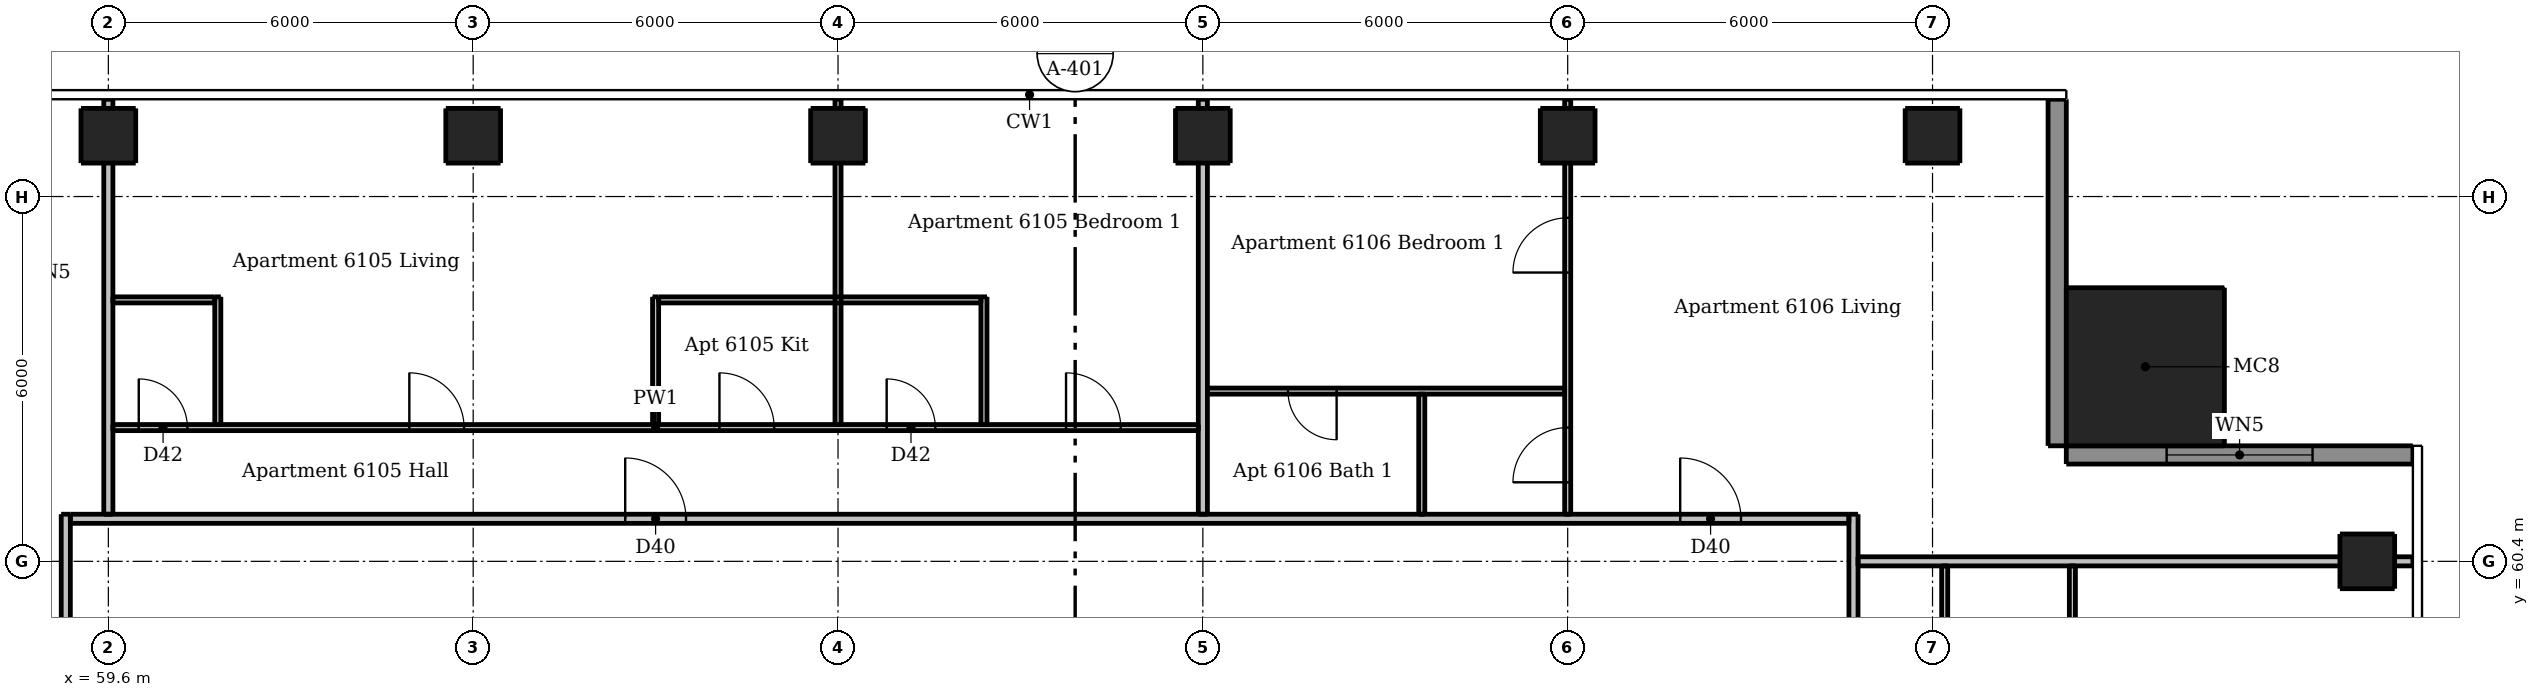
"""IFC4 building model, lengths in metres.
Left out: names, types, materials, properties, quantities, classifications, styles, units other than length and angle.
Written with IfcOpenShell. Run it as: python <this file> out.ifc"""

import sys

from ifc_helpers import new_model, si_unit, direction, frame, frame_2d, origin, origin_2d, place, context, subcontext, project, spatial, rectangle, extrude, element, fill, save


model = new_model("IFC4")
c1 = context("Model", 3, precision=1e-05, world=origin(), true_north=direction((0.0, 1.0)))
c2 = subcontext(c1, "Body", "Model", "MODEL_VIEW")
j1 = project(units=[si_unit("LENGTHUNIT", "METRE"), si_unit("PLANEANGLEUNIT", "RADIAN")], contexts=[c1])
p1 = place(None, origin())
s1 = spatial("IfcSite", under=j1, at=p1, CompositionType="ELEMENT")
p2 = place(p1, origin())
s2 = spatial("IfcBuilding", under=s1, at=p2, CompositionType="ELEMENT")
p3 = place(p2, frame((0.0, 0.0, 226.6)))
s3 = spatial("IfcBuildingStorey", under=s2, at=p3, CompositionType="ELEMENT", Elevation=226.6)
for number, where, z_axis, x_axis in (
    (1, (96.75, 60.4, 0.0), (0.0, 0.0, 1.0), (1.0, 0.0, 0.0)),
    (2, (59.6, 67.4, 0.0), (0.0, 0.0, 1.0), (1.0, 0.0, 0.0)),
    (3, (65.6, 67.4, 0.0), (0.0, 0.0, 1.0), (1.0, 0.0, 0.0)),
    (4, (71.6, 67.4, 0.0), (0.0, 0.0, 1.0), (1.0, 0.0, 0.0)),
    (5, (77.6, 67.4, 0.0), (0.0, 0.0, 1.0), (1.0, 0.0, 0.0)),
    (6, (83.6, 67.4, 0.0), (0.0, 0.0, 1.0), (1.0, 0.0, 0.0)),
    (7, (89.6, 67.4, 0.0), (0.0, 0.0, 1.0), (1.0, 0.0, 0.0)),
):
    element("IfcColumn", number, at=place(p3, frame(where, z_axis=z_axis, x_axis=x_axis)), inside=s3, PredefinedType="COLUMN", context=c2, shape_type="SweptSolid", body=[
        extrude(rectangle(XDim=0.9, YDim=0.9, at=origin_2d()), origin(), (0.0, 0.0, 1.0), 2.95),
    ])
p4 = place(p3, frame((93.1, 63.6, 0.0), z_axis=(0.0, 0.0, 1.0), x_axis=(1.0, 0.0, 0.0)))
e8 = element("IfcColumn", 8, at=p4, inside=s3, PredefinedType="COLUMN", context=c2, shape_type="SweptSolid", body=[
    extrude(rectangle(XDim=2.6, YDim=2.6, at=origin_2d()), origin(), (0.0, 0.0, 1.0), 3.3),
])
p5 = place(p3, frame((97.5, 62.15, 0.0), z_axis=(0.0, 0.0, 1.0), x_axis=(-1.0, 0.0, 0.0)))
e9 = element("IfcWall", 9, at=p5, inside=s3, PredefinedType="SOLIDWALL", context=c2, shape_type="SweptSolid", body=[
    extrude(rectangle(XDim=5.7, YDim=0.3, at=frame_2d((2.85, 0.0))), origin(), (0.0, 0.0, 1.0), 2.95),
])
p6 = place(p5, frame((1.65, 0.0, 0.15)))
e10 = element("IfcOpeningElement", 10, at=p6, cuts=e9, PredefinedType="OPENING", context=c2, shape_type="SweptSolid", body=[
    extrude(rectangle(XDim=2.4, YDim=2.1, at=frame_2d((1.2, 1.05))), frame((0.0, 0.16, 0.0), z_axis=(0.0, -1.0, 0.0), x_axis=(1.0, 0.0, 0.0)), (0.0, 0.0, 1.0), 0.32),
])
p7 = place(p3, frame((91.65, 62.3, 0.0), z_axis=(0.0, 0.0, 1.0), x_axis=(0.0, 1.0, 0.0)))
e11 = element("IfcWall", 11, at=p7, inside=s3, PredefinedType="SOLIDWALL", context=c2, shape_type="SweptSolid", body=[
    extrude(rectangle(XDim=5.7, YDim=0.3, at=frame_2d((2.85, 0.0))), origin(), (0.0, 0.0, 1.0), 2.95),
])
for number, where, z_axis, x_axis in (
    (12, (61.4, 62.65, 0.0), (0.0, 0.0, 1.0), (0.0, 1.0, 0.0)),
    (13, (68.6, 62.65, 0.0), (0.0, 0.0, 1.0), (0.0, 1.0, 0.0)),
):
    element("IfcWall", number, at=place(p3, frame(where, z_axis=z_axis, x_axis=x_axis)), inside=s3, PredefinedType="PARTITIONING", context=c2, shape_type="SweptSolid", body=[
        extrude(rectangle(XDim=2.1, YDim=0.1, at=frame_2d((1.05, 0.0))), origin(), (0.0, 0.0, 1.0), 2.95),
    ])
p8 = place(p3, frame((71.6, 62.65, 0.0), z_axis=(0.0, 0.0, 1.0), x_axis=(0.0, 1.0, 0.0)))
e14 = element("IfcWall", 14, at=p8, inside=s3, PredefinedType="PARTITIONING", context=c2, shape_type="SweptSolid", body=[
    extrude(rectangle(XDim=5.35, YDim=0.1, at=frame_2d((2.675, 0.0))), origin(), (0.0, 0.0, 1.0), 2.332),
])
p9 = place(p3, frame((74.0, 62.65, 0.0), z_axis=(0.0, 0.0, 1.0), x_axis=(0.0, 1.0, 0.0)))
e15 = element("IfcWall", 15, at=p9, inside=s3, PredefinedType="PARTITIONING", context=c2, shape_type="SweptSolid", body=[
    extrude(rectangle(XDim=2.1, YDim=0.1, at=frame_2d((1.05, 0.0))), origin(), (0.0, 0.0, 1.0), 2.95),
])
p10 = place(p3, frame((81.2, 61.175, 0.0), z_axis=(0.0, 0.0, 1.0), x_axis=(0.0, 1.0, 0.0)))
e16 = element("IfcWall", 16, at=p10, inside=s3, PredefinedType="PARTITIONING", context=c2, shape_type="SweptSolid", body=[
    extrude(rectangle(XDim=1.975, YDim=0.1, at=frame_2d((0.987, 0.0))), origin(), (0.0, 0.0, 1.0), 2.95),
])
p11 = place(p3, frame((83.6, 61.175, 0.0), z_axis=(0.0, 0.0, 1.0), x_axis=(0.0, 1.0, 0.0)))
e17 = element("IfcWall", 17, at=p11, inside=s3, PredefinedType="PARTITIONING", context=c2, shape_type="SweptSolid", body=[
    extrude(rectangle(XDim=6.825, YDim=0.1, at=frame_2d((3.413, 0.0))), origin(), (0.0, 0.0, 1.0), 2.332),
])
p12 = place(p11, frame((0.525, 0.0, 0.0)))
e18 = element("IfcOpeningElement", 18, at=p12, cuts=e17, PredefinedType="OPENING", context=c2, shape_type="SweptSolid", body=[
    extrude(rectangle(XDim=0.9, YDim=2.1, at=frame_2d((0.45, 1.05))), frame((0.0, 0.06, 0.0), z_axis=(0.0, -1.0, 0.0), x_axis=(1.0, 0.0, 0.0)), (0.0, 0.0, 1.0), 0.12),
])
p13 = place(p11, frame((3.975, 0.0, 0.0)))
e19 = element("IfcOpeningElement", 19, at=p13, cuts=e17, PredefinedType="OPENING", context=c2, shape_type="SweptSolid", body=[
    extrude(rectangle(XDim=0.9, YDim=2.1, at=frame_2d((0.45, 1.05))), frame((0.0, 0.06, 0.0), z_axis=(0.0, -1.0, 0.0), x_axis=(1.0, 0.0, 0.0)), (0.0, 0.0, 1.0), 0.12),
])
p14 = place(p3, frame((89.8, 60.325, 0.0), z_axis=(0.0, 0.0, 1.0), x_axis=(0.0, -1.0, 0.0)))
e20 = element("IfcWall", 20, at=p14, inside=s3, PredefinedType="PARTITIONING", context=c2, shape_type="SweptSolid", body=[
    extrude(rectangle(XDim=20.85, YDim=0.1, at=frame_2d((10.425, 0.0))), origin(), (0.0, 0.0, 1.0), 2.95),
])
p15 = place(p14, frame((6.075, 0.0, 0.0)))
e21 = element("IfcOpeningElement", 21, at=p15, cuts=e20, PredefinedType="OPENING", context=c2, shape_type="SweptSolid", body=[
    extrude(rectangle(XDim=0.9, YDim=2.1, at=frame_2d((0.45, 1.05))), frame((0.0, 0.06, 0.0), z_axis=(0.0, -1.0, 0.0), x_axis=(1.0, 0.0, 0.0)), (0.0, 0.0, 1.0), 0.12),
])
p16 = place(p14, frame((0.975, 0.0, 0.0)))
e22 = element("IfcOpeningElement", 22, at=p16, cuts=e20, PredefinedType="OPENING", context=c2, shape_type="SweptSolid", body=[
    extrude(rectangle(XDim=0.9, YDim=2.1, at=frame_2d((0.45, 1.05))), frame((0.0, 0.06, 0.0), z_axis=(0.0, -1.0, 0.0), x_axis=(1.0, 0.0, 0.0)), (0.0, 0.0, 1.0), 0.12),
])
p17 = place(p14, frame((10.625, 0.0, 0.0)))
e23 = element("IfcOpeningElement", 23, at=p17, cuts=e20, PredefinedType="OPENING", context=c2, shape_type="SweptSolid", body=[
    extrude(rectangle(XDim=0.8, YDim=2.1, at=frame_2d((0.4, 1.05))), frame((0.0, 0.06, 0.0), z_axis=(0.0, -1.0, 0.0), x_axis=(1.0, 0.0, 0.0)), (0.0, 0.0, 1.0), 0.12),
])
p18 = place(p14, frame((18.975, 0.0, 0.0)))
e24 = element("IfcOpeningElement", 24, at=p18, cuts=e20, PredefinedType="OPENING", context=c2, shape_type="SweptSolid", body=[
    extrude(rectangle(XDim=0.9, YDim=2.1, at=frame_2d((0.45, 1.05))), frame((0.0, 0.06, 0.0), z_axis=(0.0, -1.0, 0.0), x_axis=(1.0, 0.0, 0.0)), (0.0, 0.0, 1.0), 0.12),
])
p19 = place(p14, frame((15.675, 0.0, 0.0)))
e25 = element("IfcOpeningElement", 25, at=p19, cuts=e20, PredefinedType="OPENING", context=c2, shape_type="SweptSolid", body=[
    extrude(rectangle(XDim=0.9, YDim=2.1, at=frame_2d((0.45, 1.05))), frame((0.0, 0.06, 0.0), z_axis=(0.0, -1.0, 0.0), x_axis=(1.0, 0.0, 0.0)), (0.0, 0.0, 1.0), 0.12),
])
p20 = place(p14, frame((12.725, 0.0, 0.0)))
e26 = element("IfcOpeningElement", 26, at=p20, cuts=e20, PredefinedType="OPENING", context=c2, shape_type="SweptSolid", body=[
    extrude(rectangle(XDim=0.8, YDim=2.1, at=frame_2d((0.4, 1.05))), frame((0.0, 0.06, 0.0), z_axis=(0.0, -1.0, 0.0), x_axis=(1.0, 0.0, 0.0)), (0.0, 0.0, 1.0), 0.12),
])
p21 = place(p3, frame((91.9, 57.35, 0.0), z_axis=(0.0, 0.0, 1.0), x_axis=(0.0, 1.0, 0.0)))
e27 = element("IfcWall", 27, at=p21, inside=s3, PredefinedType="PARTITIONING", context=c2, shape_type="SweptSolid", body=[
    extrude(rectangle(XDim=2.975, YDim=0.1, at=frame_2d((1.487, 0.0))), origin(), (0.0, 0.0, 1.0), 2.95),
])
p22 = place(p3, frame((59.675, 64.7, 0.0), z_axis=(0.0, 0.0, 1.0), x_axis=(1.0, 0.0, 0.0)))
e28 = element("IfcWall", 28, at=p22, inside=s3, PredefinedType="PARTITIONING", context=c2, shape_type="SweptSolid", body=[
    extrude(rectangle(XDim=1.675, YDim=0.1, at=frame_2d((0.837, 0.0))), origin(), (0.0, 0.0, 1.0), 2.95),
])
p23 = place(p3, frame((68.65, 64.7, 0.0), z_axis=(0.0, 0.0, 1.0), x_axis=(1.0, 0.0, 0.0)))
e29 = element("IfcWall", 29, at=p23, inside=s3, PredefinedType="PARTITIONING", context=c2, shape_type="SweptSolid", body=[
    extrude(rectangle(XDim=5.3, YDim=0.1, at=frame_2d((2.65, 0.0))), origin(), (0.0, 0.0, 1.0), 2.95),
])
p24 = place(p3, frame((83.55, 63.2, 0.0), z_axis=(0.0, 0.0, 1.0), x_axis=(-1.0, 0.0, 0.0)))
e30 = element("IfcWall", 30, at=p24, inside=s3, PredefinedType="PARTITIONING", context=c2, shape_type="SweptSolid", body=[
    extrude(rectangle(XDim=5.875, YDim=0.1, at=frame_2d((2.938, 0.0))), origin(), (0.0, 0.0, 1.0), 2.95),
])
p25 = place(p24, frame((3.75, 0.0, 0.0)))
e31 = element("IfcOpeningElement", 31, at=p25, cuts=e30, PredefinedType="OPENING", context=c2, shape_type="SweptSolid", body=[
    extrude(rectangle(XDim=0.8, YDim=2.1, at=frame_2d((0.4, 1.05))), frame((0.0, 0.06, 0.0), z_axis=(0.0, -1.0, 0.0), x_axis=(1.0, 0.0, 0.0)), (0.0, 0.0, 1.0), 0.12),
])
p26 = place(p3, frame((59.675, 62.6, 0.0), z_axis=(0.0, 0.0, 1.0), x_axis=(1.0, 0.0, 0.0)))
e32 = element("IfcWall", 32, at=p26, inside=s3, PredefinedType="PARTITIONING", context=c2, shape_type="SweptSolid", body=[
    extrude(rectangle(XDim=17.85, YDim=0.1, at=frame_2d((8.925, 0.0))), origin(), (0.0, 0.0, 1.0), 2.95),
])
p27 = place(p26, frame((4.875, 0.0, 0.0)))
e33 = element("IfcOpeningElement", 33, at=p27, cuts=e32, PredefinedType="OPENING", context=c2, shape_type="SweptSolid", body=[
    extrude(rectangle(XDim=0.9, YDim=2.1, at=frame_2d((0.45, 1.05))), frame((0.0, 0.06, 0.0), z_axis=(0.0, -1.0, 0.0), x_axis=(1.0, 0.0, 0.0)), (0.0, 0.0, 1.0), 0.12),
])
p28 = place(p26, frame((9.975, 0.0, 0.0)))
e34 = element("IfcOpeningElement", 34, at=p28, cuts=e32, PredefinedType="OPENING", context=c2, shape_type="SweptSolid", body=[
    extrude(rectangle(XDim=0.9, YDim=2.1, at=frame_2d((0.45, 1.05))), frame((0.0, 0.06, 0.0), z_axis=(0.0, -1.0, 0.0), x_axis=(1.0, 0.0, 0.0)), (0.0, 0.0, 1.0), 0.12),
])
p29 = place(p26, frame((0.425, 0.0, 0.0)))
e35 = element("IfcOpeningElement", 35, at=p29, cuts=e32, PredefinedType="OPENING", context=c2, shape_type="SweptSolid", body=[
    extrude(rectangle(XDim=0.8, YDim=2.1, at=frame_2d((0.4, 1.05))), frame((0.0, 0.06, 0.0), z_axis=(0.0, -1.0, 0.0), x_axis=(1.0, 0.0, 0.0)), (0.0, 0.0, 1.0), 0.12),
])
p30 = place(p26, frame((15.675, 0.0, 0.0)))
e36 = element("IfcOpeningElement", 36, at=p30, cuts=e32, PredefinedType="OPENING", context=c2, shape_type="SweptSolid", body=[
    extrude(rectangle(XDim=0.9, YDim=2.1, at=frame_2d((0.45, 1.05))), frame((0.0, 0.06, 0.0), z_axis=(0.0, -1.0, 0.0), x_axis=(1.0, 0.0, 0.0)), (0.0, 0.0, 1.0), 0.12),
])
p31 = place(p26, frame((12.725, 0.0, 0.0)))
e37 = element("IfcOpeningElement", 37, at=p31, cuts=e32, PredefinedType="OPENING", context=c2, shape_type="SweptSolid", body=[
    extrude(rectangle(XDim=0.8, YDim=2.1, at=frame_2d((0.4, 1.05))), frame((0.0, 0.06, 0.0), z_axis=(0.0, -1.0, 0.0), x_axis=(1.0, 0.0, 0.0)), (0.0, 0.0, 1.0), 0.12),
])
p32 = place(p3, frame((58.9, 30.325, 0.0), z_axis=(0.0, 0.0, 1.0), x_axis=(0.0, 1.0, 0.0)))
e38 = element("IfcWall", 38, at=p32, inside=s3, PredefinedType="PARTITIONING", context=c2, shape_type="SweptSolid", body=[
    extrude(rectangle(XDim=30.85, YDim=0.15, at=frame_2d((15.425, 0.0))), origin(), (0.0, 0.0, 1.0), 2.95),
])
p33 = place(p32, frame((9.225, 0.0, 0.0)))
e39 = element("IfcOpeningElement", 39, at=p33, cuts=e38, PredefinedType="OPENING", context=c2, shape_type="SweptSolid", body=[
    extrude(rectangle(XDim=1.0, YDim=2.1, at=frame_2d((0.5, 1.05))), frame((0.0, 0.085, 0.0), z_axis=(0.0, -1.0, 0.0), x_axis=(1.0, 0.0, 0.0)), (0.0, 0.0, 1.0), 0.17),
])
p34 = place(p32, frame((26.925, 0.0, 0.0)))
e40 = element("IfcOpeningElement", 40, at=p34, cuts=e38, PredefinedType="OPENING", context=c2, shape_type="SweptSolid", body=[
    extrude(rectangle(XDim=1.0, YDim=2.1, at=frame_2d((0.5, 1.05))), frame((0.0, 0.085, 0.0), z_axis=(0.0, -1.0, 0.0), x_axis=(1.0, 0.0, 0.0)), (0.0, 0.0, 1.0), 0.17),
])
for number, where, z_axis, x_axis in (
    (41, (59.6, 61.175, 0.0), (0.0, 0.0, 1.0), (0.0, 1.0, 0.0)),
    (42, (77.6, 61.175, 0.0), (0.0, 0.0, 1.0), (0.0, 1.0, 0.0)),
):
    element("IfcWall", number, at=place(p3, frame(where, z_axis=z_axis, x_axis=x_axis)), inside=s3, PredefinedType="PARTITIONING", context=c2, shape_type="SweptSolid", body=[
        extrude(rectangle(XDim=6.825, YDim=0.15, at=frame_2d((3.413, 0.0))), origin(), (0.0, 0.0, 1.0), 2.332),
    ])
p35 = place(p3, frame((88.3, 61.175, 0.0), z_axis=(0.0, 0.0, 1.0), x_axis=(0.0, -1.0, 0.0)))
e43 = element("IfcWall", 43, at=p35, inside=s3, PredefinedType="PARTITIONING", context=c2, shape_type="SweptSolid", body=[
    extrude(rectangle(XDim=29.4, YDim=0.15, at=frame_2d((14.7, 0.0))), origin(), (0.0, 0.0, 1.0), 2.95),
])
p36 = place(p35, frame((28.125, 0.0, 0.0)))
e44 = element("IfcOpeningElement", 44, at=p36, cuts=e43, PredefinedType="OPENING", context=c2, shape_type="SweptSolid", body=[
    extrude(rectangle(XDim=1.0, YDim=2.1, at=frame_2d((0.5, 1.05))), frame((0.0, 0.085, 0.0), z_axis=(0.0, -1.0, 0.0), x_axis=(1.0, 0.0, 0.0)), (0.0, 0.0, 1.0), 0.17),
])
p37 = place(p35, frame((10.775, 0.0, 0.0)))
e45 = element("IfcOpeningElement", 45, at=p37, cuts=e43, PredefinedType="OPENING", context=c2, shape_type="SweptSolid", body=[
    extrude(rectangle(XDim=1.0, YDim=2.1, at=frame_2d((0.5, 1.05))), frame((0.0, 0.085, 0.0), z_axis=(0.0, -1.0, 0.0), x_axis=(1.0, 0.0, 0.0)), (0.0, 0.0, 1.0), 0.17),
])
p38 = place(p3, frame((58.975, 61.1, 0.0), z_axis=(0.0, 0.0, 1.0), x_axis=(1.0, 0.0, 0.0)))
e46 = element("IfcWall", 46, at=p38, inside=s3, PredefinedType="PARTITIONING", context=c2, shape_type="SweptSolid", body=[
    extrude(rectangle(XDim=29.25, YDim=0.15, at=frame_2d((14.625, 0.0))), origin(), (0.0, 0.0, 1.0), 2.95),
])
p39 = place(p38, frame((9.125, 0.0, 0.0)))
e47 = element("IfcOpeningElement", 47, at=p39, cuts=e46, PredefinedType="OPENING", context=c2, shape_type="SweptSolid", body=[
    extrude(rectangle(XDim=1.0, YDim=2.1, at=frame_2d((0.5, 1.05))), frame((0.0, 0.085, 0.0), z_axis=(0.0, -1.0, 0.0), x_axis=(1.0, 0.0, 0.0)), (0.0, 0.0, 1.0), 0.17),
])
p40 = place(p38, frame((26.475, 0.0, 0.0)))
e48 = element("IfcOpeningElement", 48, at=p40, cuts=e46, PredefinedType="OPENING", context=c2, shape_type="SweptSolid", body=[
    extrude(rectangle(XDim=1.0, YDim=2.1, at=frame_2d((0.5, 1.05))), frame((0.0, 0.085, 0.0), z_axis=(0.0, -1.0, 0.0), x_axis=(1.0, 0.0, 0.0)), (0.0, 0.0, 1.0), 0.17),
])
p41 = place(p3, frame((88.375, 60.4, 0.0), z_axis=(0.0, 0.0, 1.0), x_axis=(1.0, 0.0, 0.0)))
e49 = element("IfcWall", 49, at=p41, inside=s3, PredefinedType="PARTITIONING", context=c2, shape_type="SweptSolid", body=[
    extrude(rectangle(XDim=9.125, YDim=0.15, at=frame_2d((4.562, 0.0))), origin(), (0.0, 0.0, 1.0), 2.332),
])
p42 = place(p6, origin())
e50 = element("IfcWindow", 50, at=p42, inside=s3, PartitioningType="DOUBLE_PANEL_VERTICAL", PredefinedType="WINDOW", context=c2, shape_type="SweptSolid", body=[
    extrude(rectangle(XDim=2.4, YDim=2.1, at=frame_2d((1.2, 1.05))), frame((0.0, 0.03, 0.0), z_axis=(0.0, -1.0, 0.0), x_axis=(1.0, 0.0, 0.0)), (0.0, 0.0, 1.0), 0.06),
])
fill(e10, e50)
p43 = place(p39, origin())
e51 = element("IfcDoor", 51, at=p43, inside=s3, OperationType="SINGLE_SWING_LEFT", PredefinedType="DOOR", context=c2, shape_type="SweptSolid", body=[
    extrude(rectangle(XDim=1.0, YDim=2.1, at=frame_2d((0.5, 1.05))), frame((0.0, 0.025, 0.0), z_axis=(0.0, -1.0, 0.0), x_axis=(1.0, 0.0, 0.0)), (0.0, 0.0, 1.0), 0.05),
])
fill(e47, e51)
p44 = place(p27, origin())
e52 = element("IfcDoor", 52, at=p44, inside=s3, OperationType="SINGLE_SWING_LEFT", PredefinedType="DOOR", context=c2, shape_type="SweptSolid", body=[
    extrude(rectangle(XDim=0.9, YDim=2.1, at=frame_2d((0.45, 1.05))), frame((0.0, 0.025, 0.0), z_axis=(0.0, -1.0, 0.0), x_axis=(1.0, 0.0, 0.0)), (0.0, 0.0, 1.0), 0.05),
])
fill(e33, e52)
p45 = place(p28, origin())
e53 = element("IfcDoor", 53, at=p45, inside=s3, OperationType="SINGLE_SWING_LEFT", PredefinedType="DOOR", context=c2, shape_type="SweptSolid", body=[
    extrude(rectangle(XDim=0.9, YDim=2.1, at=frame_2d((0.45, 1.05))), frame((0.0, 0.025, 0.0), z_axis=(0.0, -1.0, 0.0), x_axis=(1.0, 0.0, 0.0)), (0.0, 0.0, 1.0), 0.05),
])
fill(e34, e53)
p46 = place(p29, origin())
e54 = element("IfcDoor", 54, at=p46, inside=s3, OperationType="SINGLE_SWING_LEFT", PredefinedType="DOOR", context=c2, shape_type="SweptSolid", body=[
    extrude(rectangle(XDim=0.8, YDim=2.1, at=frame_2d((0.4, 1.05))), frame((0.0, 0.025, 0.0), z_axis=(0.0, -1.0, 0.0), x_axis=(1.0, 0.0, 0.0)), (0.0, 0.0, 1.0), 0.05),
])
fill(e35, e54)
p47 = place(p30, origin())
e55 = element("IfcDoor", 55, at=p47, inside=s3, OperationType="SINGLE_SWING_LEFT", PredefinedType="DOOR", context=c2, shape_type="SweptSolid", body=[
    extrude(rectangle(XDim=0.9, YDim=2.1, at=frame_2d((0.45, 1.05))), frame((0.0, 0.025, 0.0), z_axis=(0.0, -1.0, 0.0), x_axis=(1.0, 0.0, 0.0)), (0.0, 0.0, 1.0), 0.05),
])
fill(e36, e55)
p48 = place(p31, origin())
e56 = element("IfcDoor", 56, at=p48, inside=s3, OperationType="SINGLE_SWING_LEFT", PredefinedType="DOOR", context=c2, shape_type="SweptSolid", body=[
    extrude(rectangle(XDim=0.8, YDim=2.1, at=frame_2d((0.4, 1.05))), frame((0.0, 0.025, 0.0), z_axis=(0.0, -1.0, 0.0), x_axis=(1.0, 0.0, 0.0)), (0.0, 0.0, 1.0), 0.05),
])
fill(e37, e56)
p49 = place(p40, origin())
e57 = element("IfcDoor", 57, at=p49, inside=s3, OperationType="SINGLE_SWING_LEFT", PredefinedType="DOOR", context=c2, shape_type="SweptSolid", body=[
    extrude(rectangle(XDim=1.0, YDim=2.1, at=frame_2d((0.5, 1.05))), frame((0.0, 0.025, 0.0), z_axis=(0.0, -1.0, 0.0), x_axis=(1.0, 0.0, 0.0)), (0.0, 0.0, 1.0), 0.05),
])
fill(e48, e57)
p50 = place(p12, origin())
e58 = element("IfcDoor", 58, at=p50, inside=s3, OperationType="SINGLE_SWING_LEFT", PredefinedType="DOOR", context=c2, shape_type="SweptSolid", body=[
    extrude(rectangle(XDim=0.9, YDim=2.1, at=frame_2d((0.45, 1.05))), frame((0.0, 0.025, 0.0), z_axis=(0.0, -1.0, 0.0), x_axis=(1.0, 0.0, 0.0)), (0.0, 0.0, 1.0), 0.05),
])
fill(e18, e58)
p51 = place(p13, origin())
e59 = element("IfcDoor", 59, at=p51, inside=s3, OperationType="SINGLE_SWING_LEFT", PredefinedType="DOOR", context=c2, shape_type="SweptSolid", body=[
    extrude(rectangle(XDim=0.9, YDim=2.1, at=frame_2d((0.45, 1.05))), frame((0.0, 0.025, 0.0), z_axis=(0.0, -1.0, 0.0), x_axis=(1.0, 0.0, 0.0)), (0.0, 0.0, 1.0), 0.05),
])
fill(e19, e59)
p52 = place(p25, origin())
e60 = element("IfcDoor", 60, at=p52, inside=s3, OperationType="SINGLE_SWING_LEFT", PredefinedType="DOOR", context=c2, shape_type="SweptSolid", body=[
    extrude(rectangle(XDim=0.8, YDim=2.1, at=frame_2d((0.4, 1.05))), frame((0.0, 0.025, 0.0), z_axis=(0.0, -1.0, 0.0), x_axis=(1.0, 0.0, 0.0)), (0.0, 0.0, 1.0), 0.05),
])
fill(e31, e60)
save(model, sys.argv[1])
